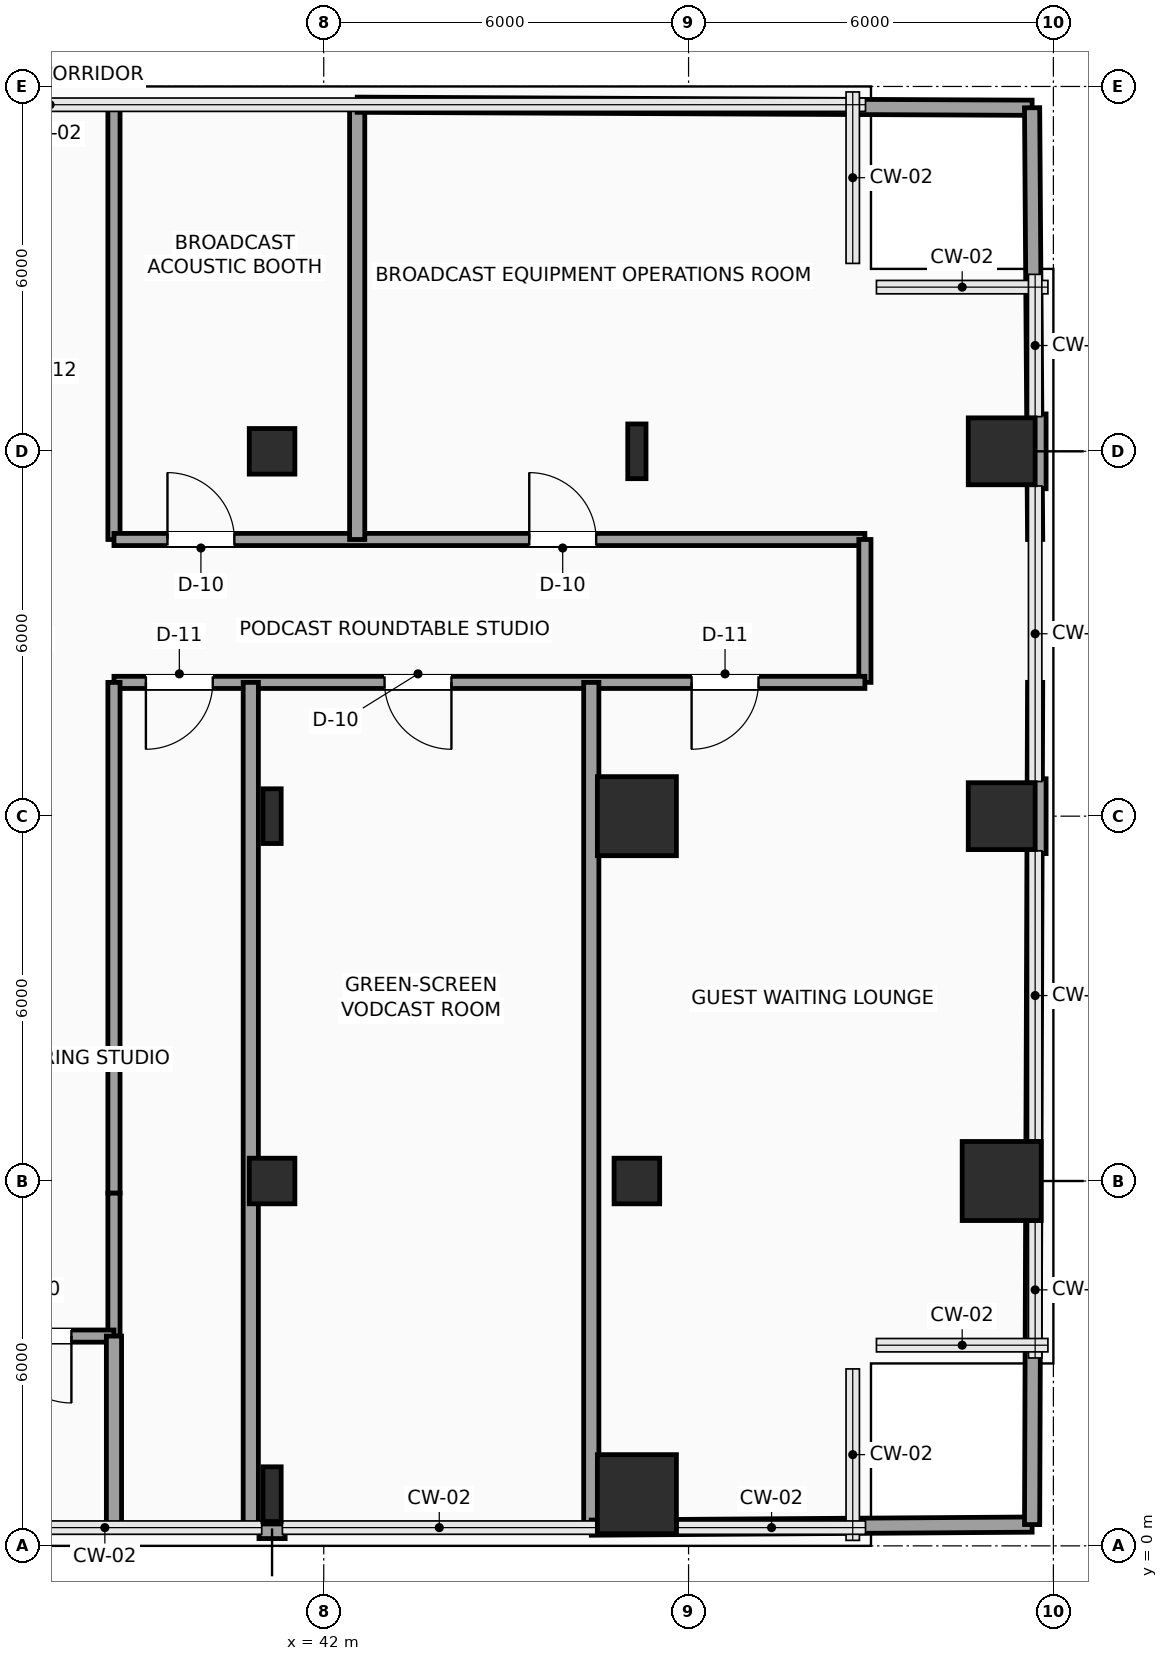
"""IFC4 building model, lengths in metres.
Left out: names, types, materials, properties, quantities, classifications, styles, units other than length and angle.
Written with IfcOpenShell. Run it as: python <this file> out.ifc"""

import sys

from ifc_helpers import new_model, si_unit, direction, frame, frame_2d, origin, origin_2d, place, context, subcontext, project, spatial, rectangle, hollow_rectangle, i_section, extrude, element, fill, save


model = new_model("IFC4")
c1 = context("Model", 3, precision=1e-05, world=origin(), true_north=direction((0.0, 1.0)))
c2 = subcontext(c1, "Body", "Model", "MODEL_VIEW")
j1 = project(units=[si_unit("LENGTHUNIT", "METRE"), si_unit("PLANEANGLEUNIT", "RADIAN")], contexts=[c1])
p1 = place(None, origin())
s1 = spatial("IfcSite", under=j1, at=p1, CompositionType="ELEMENT")
p2 = place(p1, origin())
s2 = spatial("IfcBuilding", under=s1, at=p2, CompositionType="ELEMENT")
p3 = place(p2, frame((0.0, 0.0, 79.2)))
s3 = spatial("IfcBuildingStorey", under=s2, at=p3, CompositionType="ELEMENT", Elevation=79.2)
p4 = place(p3, frame((41.15, 0.85, 0.0), z_axis=(0.0, 0.0, 1.0), x_axis=(1.0, 0.0, 0.0)))
e1 = element("IfcColumn", 1, at=p4, inside=s3, PredefinedType="COLUMN", context=c2, shape_type="SweptSolid", body=[
    extrude(i_section(OverallWidth=0.3, OverallDepth=0.9, WebThickness=0.019, FlangeThickness=0.035, FilletRadius=0.03, at=origin_2d()), origin(), (0.0, 0.0, 1.0), 3.9),
])
p5 = place(p3, frame((41.15, 6.0, 0.0), z_axis=(0.0, 0.0, 1.0), x_axis=(1.0, 0.0, 0.0)))
e2 = element("IfcColumn", 2, at=p5, inside=s3, PredefinedType="COLUMN", context=c2, shape_type="SweptSolid", body=[
    extrude(hollow_rectangle(XDim=0.75, YDim=0.75, WallThickness=0.035, InnerFilletRadius=0.035, OuterFilletRadius=0.05, at=origin_2d()), origin(), (0.0, 0.0, 1.0), 3.9),
])
p6 = place(p3, frame((41.15, 12.0, 0.0), z_axis=(0.0, 0.0, 1.0), x_axis=(1.0, 0.0, 0.0)))
e3 = element("IfcColumn", 3, at=p6, inside=s3, PredefinedType="COLUMN", context=c2, shape_type="SweptSolid", body=[
    extrude(i_section(OverallWidth=0.3, OverallDepth=0.9, WebThickness=0.019, FlangeThickness=0.035, FilletRadius=0.03, at=origin_2d()), origin(), (0.0, 0.0, 1.0), 3.9),
])
p7 = place(p3, frame((41.15, 18.0, 0.0), z_axis=(0.0, 0.0, 1.0), x_axis=(1.0, 0.0, 0.0)))
e4 = element("IfcColumn", 4, at=p7, inside=s3, PredefinedType="COLUMN", context=c2, shape_type="SweptSolid", body=[
    extrude(hollow_rectangle(XDim=0.75, YDim=0.75, WallThickness=0.035, InnerFilletRadius=0.035, OuterFilletRadius=0.05, at=origin_2d()), origin(), (0.0, 0.0, 1.0), 3.9),
])
p8 = place(p3, frame((47.15, 0.85, 0.0), z_axis=(0.0, 0.0, 1.0), x_axis=(1.0, 0.0, 0.0)))
e5 = element("IfcColumn", 5, at=p8, inside=s3, PredefinedType="COLUMN", context=c2, shape_type="SweptSolid", body=[
    extrude(rectangle(XDim=1.3, YDim=1.3, at=origin_2d()), origin(), (0.0, 0.0, 1.0), 3.9),
])
p9 = place(p3, frame((47.15, 6.0, 0.0), z_axis=(0.0, 0.0, 1.0), x_axis=(1.0, 0.0, 0.0)))
e6 = element("IfcColumn", 6, at=p9, inside=s3, PredefinedType="COLUMN", context=c2, shape_type="SweptSolid", body=[
    extrude(hollow_rectangle(XDim=0.75, YDim=0.75, WallThickness=0.035, InnerFilletRadius=0.035, OuterFilletRadius=0.05, at=origin_2d()), origin(), (0.0, 0.0, 1.0), 3.9),
])
p10 = place(p3, frame((47.15, 12.0, 0.0), z_axis=(0.0, 0.0, 1.0), x_axis=(1.0, 0.0, 0.0)))
e7 = element("IfcColumn", 7, at=p10, inside=s3, PredefinedType="COLUMN", context=c2, shape_type="SweptSolid", body=[
    extrude(rectangle(XDim=1.3, YDim=1.3, at=origin_2d()), origin(), (0.0, 0.0, 1.0), 3.9),
])
p11 = place(p3, frame((47.15, 18.0, 0.0), z_axis=(0.0, 0.0, 1.0), x_axis=(1.0, 0.0, 0.0)))
e8 = element("IfcColumn", 8, at=p11, inside=s3, PredefinedType="COLUMN", context=c2, shape_type="SweptSolid", body=[
    extrude(i_section(OverallWidth=0.3, OverallDepth=0.9, WebThickness=0.019, FlangeThickness=0.035, FilletRadius=0.03, at=origin_2d()), origin(), (0.0, 0.0, 1.0), 3.9),
])
p12 = place(p3, frame((53.15, 6.0, 0.0), z_axis=(0.0, 0.0, 1.0), x_axis=(1.0, 0.0, 0.0)))
e9 = element("IfcColumn", 9, at=p12, inside=s3, PredefinedType="COLUMN", context=c2, shape_type="SweptSolid", body=[
    extrude(rectangle(XDim=1.3, YDim=1.3, at=origin_2d()), origin(), (0.0, 0.0, 1.0), 3.9),
])
for number, where, z_axis, x_axis in (
    (10, (53.15, 12.0, 0.0), (0.0, 0.0, 1.0), (1.0, 0.0, 0.0)),
    (11, (53.15, 18.0, 0.0), (0.0, 0.0, 1.0), (1.0, 0.0, 0.0)),
):
    element("IfcColumn", number, at=place(p3, frame(where, z_axis=z_axis, x_axis=x_axis)), inside=s3, PredefinedType="COLUMN", context=c2, shape_type="SweptSolid", body=[
        extrude(rectangle(XDim=1.1, YDim=1.1, at=origin_2d()), origin(), (0.0, 0.0, 1.0), 3.9),
    ])
for number, where, z_axis, x_axis in (
    (12, (53.76, 18.615, 0.0), (0.0, 0.0, 1.0), (0.0, -1.0, 0.0)),
    (13, (53.76, 12.615, 0.0), (0.0, 0.0, 1.0), (0.0, -1.0, 0.0)),
):
    element("IfcWall", number, at=place(p3, frame(where, z_axis=z_axis, x_axis=x_axis)), inside=s3, PredefinedType="SOLIDWALL", context=c2, shape_type="SweptSolid", body=[
        extrude(rectangle(XDim=1.23, YDim=0.24, at=frame_2d((0.615, 0.0))), origin(), (0.0, 0.0, 1.0), 3.65),
    ])
p13 = place(p3, frame((41.365, 0.24, 0.0), z_axis=(0.0, 0.0, 1.0), x_axis=(-1.0, 0.0, 0.0)))
e14 = element("IfcWall", 14, at=p13, inside=s3, PredefinedType="SOLIDWALL", context=c2, shape_type="SweptSolid", body=[
    extrude(rectangle(XDim=0.43, YDim=0.24, at=frame_2d((0.215, 0.0))), origin(), (0.0, 0.0, 1.0), 3.65),
])
p14 = place(p3, frame((38.55, 23.7, 0.0), z_axis=(0.0, 0.0, 1.0), x_axis=(0.0, -1.0, 0.0)))
e15 = element("IfcWall", 15, at=p14, inside=s3, PredefinedType="PARTITIONING", context=c2, shape_type="SweptSolid", body=[
    extrude(rectangle(XDim=7.15, YDim=0.2, at=frame_2d((3.575, 0.0))), origin(), (0.0, 0.0, 1.0), 3.65),
])
p15 = place(p3, frame((38.55, 16.55, 0.0), z_axis=(0.0, 0.0, 1.0), x_axis=(1.0, 0.0, 0.0)))
e16 = element("IfcWall", 16, at=p15, inside=s3, PredefinedType="PARTITIONING", context=c2, shape_type="SweptSolid", body=[
    extrude(rectangle(XDim=12.35, YDim=0.2, at=frame_2d((6.175, 0.0))), origin(), (0.0, 0.0, 1.0), 3.65),
])
p16 = place(p15, frame((0.88, 0.0, 0.0)))
e17 = element("IfcOpeningElement", 17, at=p16, cuts=e16, PredefinedType="OPENING", context=c2, shape_type="SweptSolid", body=[
    extrude(rectangle(XDim=1.1, YDim=2.25, at=frame_2d((0.55, 1.125))), frame((0.0, 0.11, 0.0), z_axis=(0.0, -1.0, 0.0), x_axis=(1.0, 0.0, 0.0)), (0.0, 0.0, 1.0), 0.22),
])
p17 = place(p15, frame((6.83, 0.0, 0.0)))
e18 = element("IfcOpeningElement", 18, at=p17, cuts=e16, PredefinedType="OPENING", context=c2, shape_type="SweptSolid", body=[
    extrude(rectangle(XDim=1.1, YDim=2.25, at=frame_2d((0.55, 1.125))), frame((0.0, 0.11, 0.0), z_axis=(0.0, -1.0, 0.0), x_axis=(1.0, 0.0, 0.0)), (0.0, 0.0, 1.0), 0.22),
])
p18 = place(p3, frame((50.9, 16.55, 0.0), z_axis=(0.0, 0.0, 1.0), x_axis=(0.0, -1.0, 0.0)))
e19 = element("IfcWall", 19, at=p18, inside=s3, PredefinedType="PARTITIONING", context=c2, shape_type="SweptSolid", body=[
    extrude(rectangle(XDim=2.35, YDim=0.2, at=frame_2d((1.175, 0.0))), origin(), (0.0, 0.0, 1.0), 3.65),
])
p19 = place(p3, frame((50.9, 14.2, 0.0), z_axis=(0.0, 0.0, 1.0), x_axis=(-1.0, 0.0, 0.0)))
e20 = element("IfcWall", 20, at=p19, inside=s3, PredefinedType="PARTITIONING", context=c2, shape_type="SweptSolid", body=[
    extrude(rectangle(XDim=12.35, YDim=0.2, at=frame_2d((6.175, 0.0))), origin(), (0.0, 0.0, 1.0), 3.65),
])
p20 = place(p19, frame((10.725, 0.0, 0.0)))
e21 = element("IfcOpeningElement", 21, at=p20, cuts=e20, PredefinedType="OPENING", context=c2, shape_type="SweptSolid", body=[
    extrude(rectangle(XDim=1.1, YDim=2.25, at=frame_2d((0.55, 1.125))), frame((0.0, 0.11, 0.0), z_axis=(0.0, -1.0, 0.0), x_axis=(1.0, 0.0, 0.0)), (0.0, 0.0, 1.0), 0.22),
])
p21 = place(p19, frame((6.8, 0.0, 0.0)))
e22 = element("IfcOpeningElement", 22, at=p21, cuts=e20, PredefinedType="OPENING", context=c2, shape_type="SweptSolid", body=[
    extrude(rectangle(XDim=1.1, YDim=2.25, at=frame_2d((0.55, 1.125))), frame((0.0, 0.11, 0.0), z_axis=(0.0, -1.0, 0.0), x_axis=(1.0, 0.0, 0.0)), (0.0, 0.0, 1.0), 0.22),
])
p22 = place(p19, frame((1.75, 0.0, 0.0)))
e23 = element("IfcOpeningElement", 23, at=p22, cuts=e20, PredefinedType="OPENING", context=c2, shape_type="SweptSolid", body=[
    extrude(rectangle(XDim=1.1, YDim=2.25, at=frame_2d((0.55, 1.125))), frame((0.0, 0.11, 0.0), z_axis=(0.0, -1.0, 0.0), x_axis=(1.0, 0.0, 0.0)), (0.0, 0.0, 1.0), 0.22),
])
p23 = place(p3, frame((38.55, 14.2, 0.0), z_axis=(0.0, 0.0, 1.0), x_axis=(0.0, -1.0, 0.0)))
e24 = element("IfcWall", 24, at=p23, inside=s3, PredefinedType="PARTITIONING", context=c2, shape_type="SweptSolid", body=[
    extrude(rectangle(XDim=8.4, YDim=0.2, at=frame_2d((4.2, 0.0))), origin(), (0.0, 0.0, 1.0), 3.65),
])
p24 = place(p3, frame((38.55, 5.8, 0.0), z_axis=(0.0, 0.0, 1.0), x_axis=(0.0, -1.0, 0.0)))
e25 = element("IfcWall", 25, at=p24, inside=s3, PredefinedType="PARTITIONING", context=c2, shape_type="SweptSolid", body=[
    extrude(rectangle(XDim=2.35, YDim=0.2, at=frame_2d((1.175, 0.0))), origin(), (0.0, 0.0, 1.0), 3.65),
])
p25 = place(p3, frame((38.55, 3.45, 0.0), z_axis=(0.0, 0.0, 1.0), x_axis=(-1.0, 0.0, 0.0)))
e26 = element("IfcWall", 26, at=p25, inside=s3, PredefinedType="PARTITIONING", context=c2, shape_type="SweptSolid", body=[
    extrude(rectangle(XDim=2.4, YDim=0.2, at=frame_2d((1.2, 0.0))), origin(), (0.0, 0.0, 1.0), 3.142),
])
p26 = place(p25, frame((0.7, 0.0, 0.0)))
e27 = element("IfcOpeningElement", 27, at=p26, cuts=e26, PredefinedType="OPENING", context=c2, shape_type="SweptSolid", body=[
    extrude(rectangle(XDim=1.1, YDim=2.25, at=frame_2d((0.55, 1.125))), frame((0.0, 0.11, 0.0), z_axis=(0.0, -1.0, 0.0), x_axis=(1.0, 0.0, 0.0)), (0.0, 0.0, 1.0), 0.22),
])
p27 = place(p3, frame((40.8, 0.3, 0.0), z_axis=(0.0, 0.0, 1.0), x_axis=(0.0, 1.0, 0.0)))
e28 = element("IfcWall", 28, at=p27, inside=s3, PredefinedType="PARTITIONING", context=c2, shape_type="SweptSolid", body=[
    extrude(rectangle(XDim=13.9, YDim=0.25, at=frame_2d((6.95, 0.0))), origin(), (0.0, 0.0, 1.0), 2.992),
])
p28 = place(p3, frame((46.4, 0.3, 0.0), z_axis=(0.0, 0.0, 1.0), x_axis=(0.0, 1.0, 0.0)))
e29 = element("IfcWall", 29, at=p28, inside=s3, PredefinedType="PARTITIONING", context=c2, shape_type="SweptSolid", body=[
    extrude(rectangle(XDim=13.9, YDim=0.25, at=frame_2d((6.95, 0.0))), origin(), (0.0, 0.0, 1.0), 3.65),
])
p29 = place(p3, frame((46.4, 0.3, 0.0), z_axis=(0.0, 0.0, 1.0), x_axis=(0.999976173168, 0.006903122154, 0.0)))
e30 = element("IfcWall", 30, at=p29, inside=s3, PredefinedType="PARTITIONING", context=c2, shape_type="SweptSolid", body=[
    extrude(rectangle(XDim=7.25, YDim=0.25, at=frame_2d((3.625, 0.0))), origin(), (0.0, 0.0, 1.0), 3.65),
])
p30 = place(p3, frame((53.65, 0.35, 0.0), z_axis=(0.0, 0.0, 1.0), x_axis=(0.003606251025, 0.999993497456, 0.0)))
e31 = element("IfcWall", 31, at=p30, inside=s3, PredefinedType="PARTITIONING", context=c2, shape_type="SweptSolid", body=[
    extrude(rectangle(XDim=11.035, YDim=0.25, at=frame_2d((5.518, 0.0))), origin(), (0.0, 0.0, 1.0), 3.65),
])
p31 = place(p3, frame((53.694, 12.615, 0.0), z_axis=(0.0, 0.0, 1.0), x_axis=(0.003542799701, 0.999993724265, 0.0)))
e32 = element("IfcWall", 32, at=p31, inside=s3, PredefinedType="PARTITIONING", context=c2, shape_type="SweptSolid", body=[
    extrude(rectangle(XDim=1.585, YDim=0.25, at=frame_2d((0.792, 0.0))), origin(), (0.0, 0.0, 1.0), 3.65),
])
p32 = place(p3, frame((42.55, 16.55, 0.0), z_axis=(0.0, 0.0, 1.0), x_axis=(0.0, 1.0, 0.0)))
e33 = element("IfcWall", 33, at=p32, inside=s3, PredefinedType="PARTITIONING", context=c2, shape_type="SweptSolid", body=[
    extrude(rectangle(XDim=7.15, YDim=0.25, at=frame_2d((3.575, 0.0))), origin(), (0.0, 0.0, 1.0), 3.65),
])
p33 = place(p3, frame((42.55, 23.7, 0.0), z_axis=(0.0, 0.0, 1.0), x_axis=(0.999989834782, -0.004508917104, 0.0)))
e34 = element("IfcWall", 34, at=p33, inside=s3, PredefinedType="PARTITIONING", context=c2, shape_type="SweptSolid", body=[
    extrude(rectangle(XDim=11.1, YDim=0.25, at=frame_2d((5.55, 0.0))), origin(), (0.0, 0.0, 1.0), 3.65),
])
p34 = place(p3, frame((53.7, 16.55, 0.0), z_axis=(0.0, 0.0, 1.0), x_axis=(-0.007017371073, 0.999975377948, 0.0)))
e35 = element("IfcWall", 35, at=p34, inside=s3, PredefinedType="PARTITIONING", context=c2, shape_type="SweptSolid", body=[
    extrude(rectangle(XDim=0.835, YDim=0.25, at=frame_2d((0.417, 0.0))), origin(), (0.0, 0.0, 1.0), 3.65),
])
p35 = place(p3, frame((53.686, 18.615, 0.0), z_axis=(0.0, 0.0, 1.0), x_axis=(-0.007079296972, 0.999974941463, 0.0)))
e36 = element("IfcWall", 36, at=p35, inside=s3, PredefinedType="PARTITIONING", context=c2, shape_type="SweptSolid", body=[
    extrude(rectangle(XDim=5.035, YDim=0.25, at=frame_2d((2.518, 0.0))), origin(), (0.0, 0.0, 1.0), 3.65),
])
p36 = place(p3, frame((38.55, 0.3, 0.0), z_axis=(0.0, 0.0, 1.0), x_axis=(0.0, 1.0, 0.0)))
e37 = element("IfcWall", 37, at=p36, inside=s3, PredefinedType="PARTITIONING", context=c2, shape_type="SweptSolid", body=[
    extrude(rectangle(XDim=3.15, YDim=0.25, at=frame_2d((1.575, 0.0))), origin(), (0.0, 0.0, 1.0), 3.65),
])
p37 = place(p16, origin())
e38 = element("IfcDoor", 38, at=p37, inside=s3, OperationType="SINGLE_SWING_LEFT", PredefinedType="DOOR", context=c2, shape_type="SweptSolid", body=[
    extrude(rectangle(XDim=1.1, YDim=2.25, at=frame_2d((0.55, 1.125))), frame((0.0, 0.025, 0.0), z_axis=(0.0, -1.0, 0.0), x_axis=(1.0, 0.0, 0.0)), (0.0, 0.0, 1.0), 0.05),
])
fill(e17, e38)
p38 = place(p17, origin())
e39 = element("IfcDoor", 39, at=p38, inside=s3, OperationType="SINGLE_SWING_LEFT", PredefinedType="DOOR", context=c2, shape_type="SweptSolid", body=[
    extrude(rectangle(XDim=1.1, YDim=2.25, at=frame_2d((0.55, 1.125))), frame((0.0, 0.025, 0.0), z_axis=(0.0, -1.0, 0.0), x_axis=(1.0, 0.0, 0.0)), (0.0, 0.0, 1.0), 0.05),
])
fill(e18, e39)
p39 = place(p20, origin())
e40 = element("IfcDoor", 40, at=p39, inside=s3, OperationType="SINGLE_SWING_RIGHT", PredefinedType="DOOR", context=c2, shape_type="SweptSolid", body=[
    extrude(rectangle(XDim=1.1, YDim=2.25, at=frame_2d((0.55, 1.125))), frame((0.0, 0.025, 0.0), z_axis=(0.0, -1.0, 0.0), x_axis=(1.0, 0.0, 0.0)), (0.0, 0.0, 1.0), 0.05),
])
fill(e21, e40)
p40 = place(p21, origin())
e41 = element("IfcDoor", 41, at=p40, inside=s3, OperationType="SINGLE_SWING_LEFT", PredefinedType="DOOR", context=c2, shape_type="SweptSolid", body=[
    extrude(rectangle(XDim=1.1, YDim=2.25, at=frame_2d((0.55, 1.125))), frame((0.0, 0.025, 0.0), z_axis=(0.0, -1.0, 0.0), x_axis=(1.0, 0.0, 0.0)), (0.0, 0.0, 1.0), 0.05),
])
fill(e22, e41)
p41 = place(p22, origin())
e42 = element("IfcDoor", 42, at=p41, inside=s3, OperationType="SINGLE_SWING_RIGHT", PredefinedType="DOOR", context=c2, shape_type="SweptSolid", body=[
    extrude(rectangle(XDim=1.1, YDim=2.25, at=frame_2d((0.55, 1.125))), frame((0.0, 0.025, 0.0), z_axis=(0.0, -1.0, 0.0), x_axis=(1.0, 0.0, 0.0)), (0.0, 0.0, 1.0), 0.05),
])
fill(e23, e42)
p42 = place(p26, origin())
e43 = element("IfcDoor", 43, at=p42, inside=s3, OperationType="SINGLE_SWING_LEFT", PredefinedType="DOOR", context=c2, shape_type="SweptSolid", body=[
    extrude(rectangle(XDim=1.1, YDim=2.25, at=frame_2d((0.55, 1.125))), frame((0.0, 0.025, 0.0), z_axis=(0.0, -1.0, 0.0), x_axis=(1.0, 0.0, 0.0)), (0.0, 0.0, 1.0), 0.05),
])
fill(e27, e43)
save(model, sys.argv[1])
